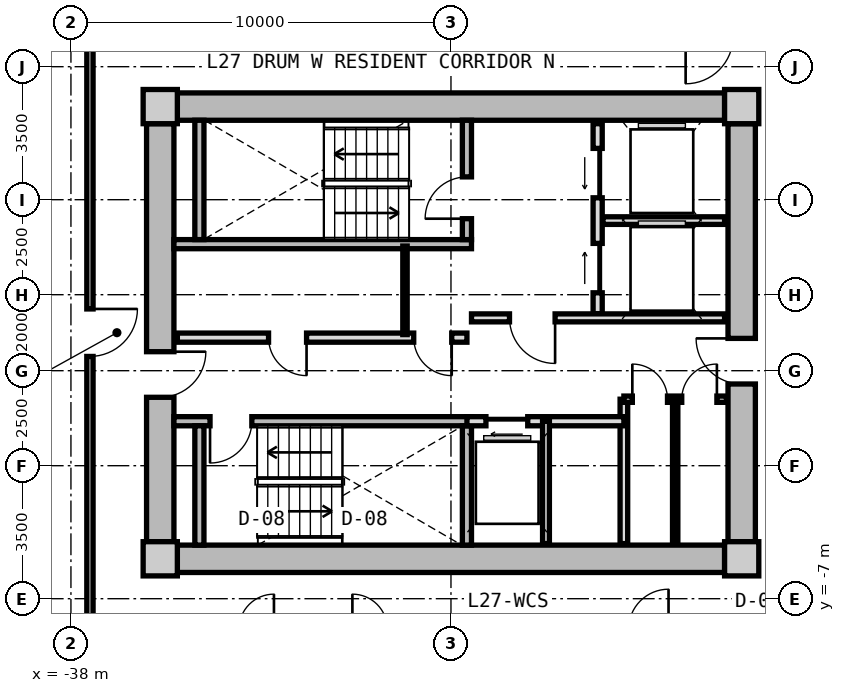
"""IFC4 building model, lengths in metres.
Left out: names, types, materials, properties, quantities, classifications, styles, units other than length and angle.
Written with IfcOpenShell. Run it as: python <this file> out.ifc"""

import sys

from ifc_helpers import new_model, si_unit, direction, frame, frame_2d, origin, origin_2d, place, context, subcontext, project, spatial, rectangle, extrude, source, transform, mapped, element, fill, save


model = new_model("IFC4")
c1 = context("Model", 3, precision=1e-05, world=origin(), true_north=direction((0.0, 1.0)))
c2 = subcontext(c1, "Body", "Model", "MODEL_VIEW")
j1 = project(units=[si_unit("LENGTHUNIT", "METRE"), si_unit("PLANEANGLEUNIT", "RADIAN")], contexts=[c1])
p1 = place(None, origin())
s1 = spatial("IfcSite", under=j1, at=p1, CompositionType="ELEMENT")
p2 = place(p1, origin())
s2 = spatial("IfcBuilding", under=s1, at=p2, CompositionType="ELEMENT")
p3 = place(p2, frame((0.0, 0.0, 90.15)))
s3 = spatial("IfcBuildingStorey", under=s2, at=p3, CompositionType="ELEMENT", Elevation=90.15)
m1 = source(origin(), c2, "Body", "SweptSolid", [
    extrude(rectangle(XDim=0.9, YDim=0.9, at=origin_2d()), origin(), (0.0, 0.0, 1.0), 3.05),
])
for number, where, z_axis, x_axis in (
    (1, (-35.65, -5.95, 0.0), (0.0, 0.0, 1.0), (1.0, 0.0, 0.0)),
    (2, (-20.35, -5.95, 0.0), (0.0, 0.0, 1.0), (1.0, 0.0, 0.0)),
    (3, (-20.35, 5.95, 0.0), (0.0, 0.0, 1.0), (1.0, 0.0, 0.0)),
    (4, (-35.65, 5.95, 0.0), (0.0, 0.0, 1.0), (1.0, 0.0, 0.0)),
):
    element("IfcColumn", number, at=place(p3, frame(where, z_axis=z_axis, x_axis=x_axis)), inside=s3, PredefinedType="COLUMN", context=c2, shape_type="MappedRepresentation", body=[
        mapped(m1, transform((0.0, 0.0, 0.0), x_axis=(1.0, 0.0, 0.0), y_axis=(0.0, 1.0, 0.0), z_axis=(0.0, 0.0, 1.0), scale=1.0)),
    ])
m2 = source(origin(), c2, "Body", "SweptSolid", [
    extrude(rectangle(XDim=14.4, YDim=0.72, at=frame_2d((7.2, 0.0))), origin(), (0.0, 0.0, 1.0), 2.79),
])
for number, where, z_axis, x_axis in (
    (5, (-35.2, 5.95, 0.0), (0.0, 0.0, 1.0), (1.0, 0.0, 0.0)),
    (6, (-20.8, -5.95, 0.0), (0.0, 0.0, 1.0), (-1.0, 0.0, 0.0)),
):
    element("IfcWall", number, at=place(p3, frame(where, z_axis=z_axis, x_axis=x_axis)), inside=s3, PredefinedType="SHEAR", context=c2, shape_type="MappedRepresentation", body=[
        mapped(m2, transform((0.0, 0.0, 0.0), x_axis=(1.0, 0.0, 0.0), y_axis=(0.0, 1.0, 0.0), z_axis=(0.0, 0.0, 1.0), scale=1.0)),
    ])
m3 = source(origin(), c2, "Body", "SweptSolid", [
    extrude(rectangle(XDim=11.0, YDim=0.72, at=frame_2d((5.5, 0.0))), origin(), (0.0, 0.0, 1.0), 2.79),
])
p4 = place(p3, frame((-35.65, -5.5, 0.0), z_axis=(0.0, 0.0, 1.0), x_axis=(0.0, 1.0, 0.0)))
e7 = element("IfcWall", 7, at=p4, inside=s3, PredefinedType="SHEAR", context=c2, shape_type="MappedRepresentation", body=[
    mapped(m3, transform((0.0, 0.0, 0.0), x_axis=(1.0, 0.0, 0.0), y_axis=(0.0, 1.0, 0.0), z_axis=(0.0, 0.0, 1.0), scale=1.0)),
])
p5 = place(p4, frame((3.8, 0.0, 0.0)))
e8 = element("IfcOpeningElement", 8, at=p5, cuts=e7, PredefinedType="OPENING", context=c2, shape_type="SweptSolid", body=[
    extrude(rectangle(XDim=1.2, YDim=2.15, at=frame_2d((0.6, 1.075))), frame((0.0, 0.37, 0.0), z_axis=(0.0, -1.0, 0.0), x_axis=(1.0, 0.0, 0.0)), (0.0, 0.0, 1.0), 0.74),
])
p6 = place(p3, frame((-20.35, 5.5, 0.0), z_axis=(0.0, 0.0, 1.0), x_axis=(0.0, -1.0, 0.0)))
e9 = element("IfcWall", 9, at=p6, inside=s3, PredefinedType="SHEAR", context=c2, shape_type="MappedRepresentation", body=[
    mapped(m3, transform((0.0, 0.0, 0.0), x_axis=(1.0, 0.0, 0.0), y_axis=(0.0, 1.0, 0.0), z_axis=(0.0, 0.0, 1.0), scale=1.0)),
])
p7 = place(p6, frame((5.65, 0.0, 0.0)))
e10 = element("IfcOpeningElement", 10, at=p7, cuts=e9, PredefinedType="OPENING", context=c2, shape_type="SweptSolid", body=[
    extrude(rectangle(XDim=1.2, YDim=2.15, at=frame_2d((0.6, 1.075))), frame((0.0, 0.37, 0.0), z_axis=(0.0, -1.0, 0.0), x_axis=(1.0, 0.0, 0.0)), (0.0, 0.0, 1.0), 0.74),
])
m4 = source(origin(), c2, "Body", "SweptSolid", [
    extrude(rectangle(XDim=7.83, YDim=0.24, at=frame_2d((3.915, 0.0))), origin(), (0.0, 0.0, 1.0), 2.79),
])
p8 = place(p3, frame((-35.29, 2.33, 0.0), z_axis=(0.0, 0.0, 1.0), x_axis=(1.0, 0.0, 0.0)))
e11 = element("IfcWall", 11, at=p8, inside=s3, PredefinedType="PARTITIONING", context=c2, shape_type="MappedRepresentation", body=[
    mapped(m4, transform((0.0, 0.0, 0.0), x_axis=(1.0, 0.0, 0.0), y_axis=(0.0, 1.0, 0.0), z_axis=(0.0, 0.0, 1.0), scale=1.0)),
])
m5 = source(origin(), c2, "Body", "SweptSolid", [
    extrude(rectangle(XDim=3.14, YDim=0.24, at=frame_2d((1.57, 0.0))), origin(), (0.0, 0.0, 1.0), 2.79),
])
p9 = place(p3, frame((-34.62, 2.45, 0.0), z_axis=(0.0, 0.0, 1.0), x_axis=(0.0, 1.0, 0.0)))
e12 = element("IfcWall", 12, at=p9, inside=s3, PredefinedType="PARTITIONING", context=c2, shape_type="MappedRepresentation", body=[
    mapped(m5, transform((0.0, 0.0, 0.0), x_axis=(1.0, 0.0, 0.0), y_axis=(0.0, 1.0, 0.0), z_axis=(0.0, 0.0, 1.0), scale=1.0)),
])
p10 = place(p3, frame((-27.58, 2.45, 0.0), z_axis=(0.0, 0.0, 1.0), x_axis=(0.0, 1.0, 0.0)))
e13 = element("IfcWall", 13, at=p10, inside=s3, PredefinedType="PARTITIONING", context=c2, shape_type="MappedRepresentation", body=[
    mapped(m5, transform((0.0, 0.0, 0.0), x_axis=(1.0, 0.0, 0.0), y_axis=(0.0, 1.0, 0.0), z_axis=(0.0, 0.0, 1.0), scale=1.0)),
])
p11 = place(p10, frame((0.55, 0.0, 0.0)))
e14 = element("IfcOpeningElement", 14, at=p11, cuts=e13, PredefinedType="OPENING", context=c2, shape_type="SweptSolid", body=[
    extrude(rectangle(XDim=1.1, YDim=2.15, at=frame_2d((0.55, 1.075))), frame((0.0, 0.13, 0.0), z_axis=(0.0, -1.0, 0.0), x_axis=(1.0, 0.0, 0.0)), (0.0, 0.0, 1.0), 0.26),
])
p12 = place(p3, frame((-35.29, -2.33, 0.0), z_axis=(0.0, 0.0, 1.0), x_axis=(1.0, 0.0, 0.0)))
e15 = element("IfcWall", 15, at=p12, inside=s3, PredefinedType="PARTITIONING", context=c2, shape_type="MappedRepresentation", body=[
    mapped(m4, transform((0.0, 0.0, 0.0), x_axis=(1.0, 0.0, 0.0), y_axis=(0.0, 1.0, 0.0), z_axis=(0.0, 0.0, 1.0), scale=1.0)),
])
p13 = place(p12, frame((0.95, 0.0, 0.0)))
e16 = element("IfcOpeningElement", 16, at=p13, cuts=e15, PredefinedType="OPENING", context=c2, shape_type="SweptSolid", body=[
    extrude(rectangle(XDim=1.1, YDim=2.15, at=frame_2d((0.55, 1.075))), frame((0.0, 0.13, 0.0), z_axis=(0.0, -1.0, 0.0), x_axis=(1.0, 0.0, 0.0)), (0.0, 0.0, 1.0), 0.26),
])
for number, where, z_axis, x_axis in (
    (17, (-34.62, -5.59, 0.0), (0.0, 0.0, 1.0), (0.0, 1.0, 0.0)),
    (18, (-27.58, -5.59, 0.0), (0.0, 0.0, 1.0), (0.0, 1.0, 0.0)),
):
    element("IfcWall", number, at=place(p3, frame(where, z_axis=z_axis, x_axis=x_axis)), inside=s3, PredefinedType="PARTITIONING", context=c2, shape_type="MappedRepresentation", body=[
        mapped(m5, transform((0.0, 0.0, 0.0), x_axis=(1.0, 0.0, 0.0), y_axis=(0.0, 1.0, 0.0), z_axis=(0.0, 0.0, 1.0), scale=1.0)),
    ])
m6 = source(origin(), c2, "Body", "SweptSolid", [
    extrude(rectangle(XDim=5.0, YDim=0.24, at=frame_2d((2.5, 0.0))), origin(), (0.0, 0.0, 1.0), 2.775),
])
p14 = place(p3, frame((-24.14, 0.5, 0.0), z_axis=(0.0, 0.0, 1.0), x_axis=(0.0, 1.0, 0.0)))
e19 = element("IfcWall", 19, at=p14, inside=s3, PredefinedType="PARTITIONING", context=c2, shape_type="MappedRepresentation", body=[
    mapped(m6, transform((0.0, 0.0, 0.0), x_axis=(1.0, 0.0, 0.0), y_axis=(0.0, 1.0, 0.0), z_axis=(0.0, 0.0, 1.0), scale=1.0)),
])
p15 = place(p14, frame((3.05, 0.0, 0.0)))
e20 = element("IfcOpeningElement", 20, at=p15, cuts=e19, PredefinedType="OPENING", context=c2, shape_type="SweptSolid", body=[
    extrude(rectangle(XDim=1.3, YDim=2.2, at=frame_2d((0.65, 1.1))), frame((0.0, 0.13, 0.0), z_axis=(0.0, -1.0, 0.0), x_axis=(1.0, 0.0, 0.0)), (0.0, 0.0, 1.0), 0.26),
])
p16 = place(p14, frame((0.55, 0.0, 0.0)))
e21 = element("IfcOpeningElement", 21, at=p16, cuts=e19, PredefinedType="OPENING", context=c2, shape_type="SweptSolid", body=[
    extrude(rectangle(XDim=1.3, YDim=2.2, at=frame_2d((0.65, 1.1))), frame((0.0, 0.13, 0.0), z_axis=(0.0, -1.0, 0.0), x_axis=(1.0, 0.0, 0.0)), (0.0, 0.0, 1.0), 0.26),
])
m7 = source(origin(), c2, "Body", "SweptSolid", [
    extrude(rectangle(XDim=3.2, YDim=0.2, at=frame_2d((1.6, 0.0))), origin(), (0.0, 0.0, 1.0), 2.775),
])
p17 = place(p3, frame((-24.0, 2.95, 0.0), z_axis=(0.0, 0.0, 1.0), x_axis=(1.0, 0.0, 0.0)))
e22 = element("IfcWall", 22, at=p17, inside=s3, PredefinedType="PARTITIONING", context=c2, shape_type="MappedRepresentation", body=[
    mapped(m7, transform((0.0, 0.0, 0.0), x_axis=(1.0, 0.0, 0.0), y_axis=(0.0, 1.0, 0.0), z_axis=(0.0, 0.0, 1.0), scale=1.0)),
])
m8 = source(origin(), c2, "Body", "SweptSolid", [
    extrude(rectangle(XDim=6.66, YDim=0.21, at=frame_2d((3.33, 0.0))), origin(), (0.0, 0.0, 1.0), 2.775),
])
p18 = place(p3, frame((-27.46, 0.39, 0.0), z_axis=(0.0, 0.0, 1.0), x_axis=(1.0, 0.0, 0.0)))
e23 = element("IfcWall", 23, at=p18, inside=s3, PredefinedType="PARTITIONING", context=c2, shape_type="MappedRepresentation", body=[
    mapped(m8, transform((0.0, 0.0, 0.0), x_axis=(1.0, 0.0, 0.0), y_axis=(0.0, 1.0, 0.0), z_axis=(0.0, 0.0, 1.0), scale=1.0)),
])
p19 = place(p18, frame((1.0, 0.0, 0.0)))
e24 = element("IfcOpeningElement", 24, at=p19, cuts=e23, PredefinedType="OPENING", context=c2, shape_type="SweptSolid", body=[
    extrude(rectangle(XDim=1.2, YDim=2.15, at=frame_2d((0.6, 1.075))), frame((0.0, 0.115, 0.0), z_axis=(0.0, -1.0, 0.0), x_axis=(1.0, 0.0, 0.0)), (0.0, 0.0, 1.0), 0.23),
])
m9 = source(origin(), c2, "Body", "SweptSolid", [
    extrude(rectangle(XDim=7.62, YDim=0.24, at=frame_2d((3.81, 0.0))), origin(), (0.0, 0.0, 1.0), 2.775),
])
p20 = place(p3, frame((-35.2, -0.13, 0.0), z_axis=(0.0, 0.0, 1.0), x_axis=(1.0, 0.0, 0.0)))
e25 = element("IfcWall", 25, at=p20, inside=s3, PredefinedType="PARTITIONING", context=c2, shape_type="MappedRepresentation", body=[
    mapped(m9, transform((0.0, 0.0, 0.0), x_axis=(1.0, 0.0, 0.0), y_axis=(0.0, 1.0, 0.0), z_axis=(0.0, 0.0, 1.0), scale=1.0)),
])
p21 = place(p20, frame((6.22, 0.0, 0.0)))
e26 = element("IfcOpeningElement", 26, at=p21, cuts=e25, PredefinedType="OPENING", context=c2, shape_type="SweptSolid", body=[
    extrude(rectangle(XDim=1.0, YDim=2.1, at=frame_2d((0.5, 1.05))), frame((0.0, 0.13, 0.0), z_axis=(0.0, -1.0, 0.0), x_axis=(1.0, 0.0, 0.0)), (0.0, 0.0, 1.0), 0.26),
])
p22 = place(p20, frame((2.4, 0.0, 0.0)))
e27 = element("IfcOpeningElement", 27, at=p22, cuts=e25, PredefinedType="OPENING", context=c2, shape_type="SweptSolid", body=[
    extrude(rectangle(XDim=1.0, YDim=2.1, at=frame_2d((0.5, 1.05))), frame((0.0, 0.13, 0.0), z_axis=(0.0, -1.0, 0.0), x_axis=(1.0, 0.0, 0.0)), (0.0, 0.0, 1.0), 0.26),
])
m10 = source(origin(), c2, "Body", "SweptSolid", [
    extrude(rectangle(XDim=2.33, YDim=0.115, at=frame_2d((1.165, 0.0))), origin(), (0.0, 0.0, 1.0), 2.775),
])
p23 = place(p3, frame((-29.21, -0.05, 0.0), z_axis=(0.0, 0.0, 1.0), x_axis=(0.0, 1.0, 0.0)))
e28 = element("IfcWall", 28, at=p23, inside=s3, PredefinedType="PARTITIONING", context=c2, shape_type="MappedRepresentation", body=[
    mapped(m10, transform((0.0, 0.0, 0.0), x_axis=(1.0, 0.0, 0.0), y_axis=(0.0, 1.0, 0.0), z_axis=(0.0, 0.0, 1.0), scale=1.0)),
])
m11 = source(origin(), c2, "Body", "SweptSolid", [
    extrude(rectangle(XDim=3.8, YDim=0.2, at=frame_2d((1.9, 0.0))), origin(), (0.0, 0.0, 1.0), 2.775),
])
p24 = place(p3, frame((-23.45, -5.55, 0.0), z_axis=(0.0, 0.0, 1.0), x_axis=(0.0, 1.0, 0.0)))
e29 = element("IfcWall", 29, at=p24, inside=s3, PredefinedType="PARTITIONING", context=c2, shape_type="MappedRepresentation", body=[
    mapped(m11, transform((0.0, 0.0, 0.0), x_axis=(1.0, 0.0, 0.0), y_axis=(0.0, 1.0, 0.0), z_axis=(0.0, 0.0, 1.0), scale=1.0)),
])
m12 = source(origin(), c2, "Body", "SweptSolid", [
    extrude(rectangle(XDim=4.13, YDim=0.24, at=frame_2d((2.065, 0.0))), origin(), (0.0, 0.0, 1.0), 2.775),
])
p25 = place(p3, frame((-27.58, -2.33, 0.0), z_axis=(0.0, 0.0, 1.0), x_axis=(1.0, 0.0, 0.0)))
e30 = element("IfcWall", 30, at=p25, inside=s3, PredefinedType="PARTITIONING", context=c2, shape_type="MappedRepresentation", body=[
    mapped(m12, transform((0.0, 0.0, 0.0), x_axis=(1.0, 0.0, 0.0), y_axis=(0.0, 1.0, 0.0), z_axis=(0.0, 0.0, 1.0), scale=1.0)),
])
p26 = place(p25, frame((0.5, 0.0, 0.0)))
e31 = element("IfcOpeningElement", 31, at=p26, cuts=e30, PredefinedType="OPENING", context=c2, shape_type="SweptSolid", body=[
    extrude(rectangle(XDim=1.1, YDim=2.2, at=frame_2d((0.55, 1.1))), frame((0.0, 0.13, 0.0), z_axis=(0.0, -1.0, 0.0), x_axis=(1.0, 0.0, 0.0)), (0.0, 0.0, 1.0), 0.26),
])
m13 = source(origin(), c2, "Body", "SweptSolid", [
    extrude(rectangle(XDim=3.22, YDim=0.18, at=frame_2d((1.61, 0.0))), origin(), (0.0, 0.0, 1.0), 2.775),
])
p27 = place(p3, frame((-25.5, -5.55, 0.0), z_axis=(0.0, 0.0, 1.0), x_axis=(0.0, 1.0, 0.0)))
e32 = element("IfcWall", 32, at=p27, inside=s3, PredefinedType="PARTITIONING", context=c2, shape_type="MappedRepresentation", body=[
    mapped(m13, transform((0.0, 0.0, 0.0), x_axis=(1.0, 0.0, 0.0), y_axis=(0.0, 1.0, 0.0), z_axis=(0.0, 0.0, 1.0), scale=1.0)),
])
m14 = source(origin(), c2, "Body", "SweptSolid", [
    extrude(rectangle(XDim=2.7, YDim=0.165, at=frame_2d((1.35, 0.0))), origin(), (0.0, 0.0, 1.0), 2.775),
])
p28 = place(p3, frame((-23.45, -1.75, 0.0), z_axis=(0.0, 0.0, 1.0), x_axis=(1.0, 0.0, 0.0)))
e33 = element("IfcWall", 33, at=p28, inside=s3, PredefinedType="PARTITIONING", context=c2, shape_type="MappedRepresentation", body=[
    mapped(m14, transform((0.0, 0.0, 0.0), x_axis=(1.0, 0.0, 0.0), y_axis=(0.0, 1.0, 0.0), z_axis=(0.0, 0.0, 1.0), scale=1.0)),
])
p29 = place(p28, frame((0.222, 0.0, 0.0)))
e34 = element("IfcOpeningElement", 34, at=p29, cuts=e33, PredefinedType="OPENING", context=c2, shape_type="SweptSolid", body=[
    extrude(rectangle(XDim=0.925, YDim=2.1, at=frame_2d((0.462, 1.05))), frame((0.0, 0.093, 0.0), z_axis=(0.0, -1.0, 0.0), x_axis=(1.0, 0.0, 0.0)), (0.0, 0.0, 1.0), 0.185),
])
p30 = place(p28, frame((1.522, 0.0, 0.0)))
e35 = element("IfcOpeningElement", 35, at=p30, cuts=e33, PredefinedType="OPENING", context=c2, shape_type="SweptSolid", body=[
    extrude(rectangle(XDim=0.925, YDim=2.1, at=frame_2d((0.462, 1.05))), frame((0.0, 0.093, 0.0), z_axis=(0.0, -1.0, 0.0), x_axis=(1.0, 0.0, 0.0)), (0.0, 0.0, 1.0), 0.185),
])
m15 = source(origin(), c2, "Body", "SweptSolid", [
    extrude(rectangle(XDim=3.8, YDim=0.14, at=frame_2d((1.9, 0.0))), origin(), (0.0, 0.0, 1.0), 2.775),
])
p31 = place(p3, frame((-22.1, -5.55, 0.0), z_axis=(0.0, 0.0, 1.0), x_axis=(0.0, 1.0, 0.0)))
e36 = element("IfcWall", 36, at=p31, inside=s3, PredefinedType="PARTITIONING", context=c2, shape_type="MappedRepresentation", body=[
    mapped(m15, transform((0.0, 0.0, 0.0), x_axis=(1.0, 0.0, 0.0), y_axis=(0.0, 1.0, 0.0), z_axis=(0.0, 0.0, 1.0), scale=1.0)),
])
m16 = source(origin(), c2, "Body", "SweptSolid", [
    extrude(rectangle(XDim=15.6, YDim=0.165, at=frame_2d((7.8, 0.0))), origin(), (0.0, 0.0, 1.0), 2.775),
])
p32 = place(p3, frame((-37.5, -7.8, 0.0), z_axis=(0.0, 0.0, 1.0), x_axis=(0.0, 1.0, 0.0)))
e37 = element("IfcWall", 37, at=p32, inside=s3, PredefinedType="PARTITIONING", context=c2, shape_type="MappedRepresentation", body=[
    mapped(m16, transform((0.0, 0.0, 0.0), x_axis=(1.0, 0.0, 0.0), y_axis=(0.0, 1.0, 0.0), z_axis=(0.0, 0.0, 1.0), scale=1.0)),
])
p33 = place(p32, frame((7.175, 0.0, 0.0)))
e38 = element("IfcOpeningElement", 38, at=p33, cuts=e37, PredefinedType="OPENING", context=c2, shape_type="SweptSolid", body=[
    extrude(rectangle(XDim=1.25, YDim=2.2, at=frame_2d((0.625, 1.1))), frame((0.0, 0.093, 0.0), z_axis=(0.0, -1.0, 0.0), x_axis=(1.0, 0.0, 0.0)), (0.0, 0.0, 1.0), 0.185),
])
m17 = source(origin(), c2, "Body", "SweptSolid", [
    extrude(rectangle(XDim=1.1, YDim=2.15, at=frame_2d((0.55, 1.075))), frame((0.0, 0.025, 0.0), z_axis=(0.0, -1.0, 0.0), x_axis=(1.0, 0.0, 0.0)), (0.0, 0.0, 1.0), 0.05),
])
p34 = place(p11, origin())
e39 = element("IfcDoor", 39, at=p34, inside=s3, OperationType="SINGLE_SWING_LEFT", PredefinedType="DOOR", context=c2, shape_type="MappedRepresentation", body=[
    mapped(m17, transform((0.0, 0.0, 0.0), x_axis=(1.0, 0.0, 0.0), y_axis=(0.0, 1.0, 0.0), z_axis=(0.0, 0.0, 1.0), scale=1.0)),
])
fill(e14, e39)
p35 = place(p13, frame((1.1, 0.0, 0.0), z_axis=(0.0, 0.0, 1.0), x_axis=(-1.0, 0.0, 0.0)))
e40 = element("IfcDoor", 40, at=p35, inside=s3, OperationType="SINGLE_SWING_RIGHT", PredefinedType="DOOR", context=c2, shape_type="MappedRepresentation", body=[
    mapped(m17, transform((0.0, 0.0, 0.0), x_axis=(1.0, 0.0, 0.0), y_axis=(0.0, 1.0, 0.0), z_axis=(0.0, 0.0, 1.0), scale=1.0)),
])
fill(e16, e40)
m18 = source(origin(), c2, "Body", "SweptSolid", [
    extrude(rectangle(XDim=1.3, YDim=2.2, at=frame_2d((0.65, 1.1))), frame((0.0, 0.025, 0.0), z_axis=(0.0, -1.0, 0.0), x_axis=(1.0, 0.0, 0.0)), (0.0, 0.0, 1.0), 0.05),
])
p36 = place(p15, origin())
e41 = element("IfcDoor", 41, at=p36, inside=s3, OperationType="SLIDING_TO_LEFT", PredefinedType="DOOR", context=c2, shape_type="MappedRepresentation", body=[
    mapped(m18, transform((0.0, 0.0, 0.0), x_axis=(1.0, 0.0, 0.0), y_axis=(0.0, 1.0, 0.0), z_axis=(0.0, 0.0, 1.0), scale=1.0)),
])
fill(e20, e41)
p37 = place(p16, origin())
e42 = element("IfcDoor", 42, at=p37, inside=s3, OperationType="SLIDING_TO_RIGHT", PredefinedType="DOOR", context=c2, shape_type="MappedRepresentation", body=[
    mapped(m18, transform((0.0, 0.0, 0.0), x_axis=(1.0, 0.0, 0.0), y_axis=(0.0, 1.0, 0.0), z_axis=(0.0, 0.0, 1.0), scale=1.0)),
])
fill(e21, e42)
m19 = source(origin(), c2, "Body", "SweptSolid", [
    extrude(rectangle(XDim=1.2, YDim=2.15, at=frame_2d((0.6, 1.075))), frame((0.0, 0.025, 0.0), z_axis=(0.0, -1.0, 0.0), x_axis=(1.0, 0.0, 0.0)), (0.0, 0.0, 1.0), 0.05),
])
p38 = place(p19, frame((1.2, 0.0, 0.0), z_axis=(0.0, 0.0, 1.0), x_axis=(-1.0, 0.0, 0.0)))
e43 = element("IfcDoor", 43, at=p38, inside=s3, OperationType="SINGLE_SWING_LEFT", PredefinedType="DOOR", context=c2, shape_type="MappedRepresentation", body=[
    mapped(m19, transform((0.0, 0.0, 0.0), x_axis=(1.0, 0.0, 0.0), y_axis=(0.0, 1.0, 0.0), z_axis=(0.0, 0.0, 1.0), scale=1.0)),
])
fill(e24, e43)
p39 = place(p5, frame((1.2, 0.0, 0.0), z_axis=(0.0, 0.0, 1.0), x_axis=(-1.0, 0.0, 0.0)))
e44 = element("IfcDoor", 44, at=p39, inside=s3, OperationType="SINGLE_SWING_LEFT", PredefinedType="DOOR", context=c2, shape_type="MappedRepresentation", body=[
    mapped(m19, transform((0.0, 0.0, 0.0), x_axis=(1.0, 0.0, 0.0), y_axis=(0.0, 1.0, 0.0), z_axis=(0.0, 0.0, 1.0), scale=1.0)),
])
fill(e8, e44)
p40 = place(p7, frame((1.2, 0.0, 0.0), z_axis=(0.0, 0.0, 1.0), x_axis=(-1.0, 0.0, 0.0)))
e45 = element("IfcDoor", 45, at=p40, inside=s3, OperationType="SINGLE_SWING_RIGHT", PredefinedType="DOOR", context=c2, shape_type="MappedRepresentation", body=[
    mapped(m19, transform((0.0, 0.0, 0.0), x_axis=(1.0, 0.0, 0.0), y_axis=(0.0, 1.0, 0.0), z_axis=(0.0, 0.0, 1.0), scale=1.0)),
])
fill(e10, e45)
m20 = source(origin(), c2, "Body", "SweptSolid", [
    extrude(rectangle(XDim=1.0, YDim=2.1, at=frame_2d((0.5, 1.05))), frame((0.0, 0.025, 0.0), z_axis=(0.0, -1.0, 0.0), x_axis=(1.0, 0.0, 0.0)), (0.0, 0.0, 1.0), 0.05),
])
p41 = place(p21, frame((1.0, 0.0, 0.0), z_axis=(0.0, 0.0, 1.0), x_axis=(-1.0, 0.0, 0.0)))
e46 = element("IfcDoor", 46, at=p41, inside=s3, OperationType="SINGLE_SWING_LEFT", PredefinedType="DOOR", context=c2, shape_type="MappedRepresentation", body=[
    mapped(m20, transform((0.0, 0.0, 0.0), x_axis=(1.0, 0.0, 0.0), y_axis=(0.0, 1.0, 0.0), z_axis=(0.0, 0.0, 1.0), scale=1.0)),
])
fill(e26, e46)
p42 = place(p22, frame((1.0, 0.0, 0.0), z_axis=(0.0, 0.0, 1.0), x_axis=(-1.0, 0.0, 0.0)))
e47 = element("IfcDoor", 47, at=p42, inside=s3, OperationType="SINGLE_SWING_LEFT", PredefinedType="DOOR", context=c2, shape_type="MappedRepresentation", body=[
    mapped(m20, transform((0.0, 0.0, 0.0), x_axis=(1.0, 0.0, 0.0), y_axis=(0.0, 1.0, 0.0), z_axis=(0.0, 0.0, 1.0), scale=1.0)),
])
fill(e27, e47)
m21 = source(origin(), c2, "Body", "SweptSolid", [
    extrude(rectangle(XDim=1.1, YDim=2.2, at=frame_2d((0.55, 1.1))), frame((0.0, 0.025, 0.0), z_axis=(0.0, -1.0, 0.0), x_axis=(1.0, 0.0, 0.0)), (0.0, 0.0, 1.0), 0.05),
])
p43 = place(p26, frame((1.1, 0.0, 0.0), z_axis=(0.0, 0.0, 1.0), x_axis=(-1.0, 0.0, 0.0)))
e48 = element("IfcDoor", 48, at=p43, inside=s3, OperationType="SLIDING_TO_LEFT", PredefinedType="DOOR", context=c2, shape_type="MappedRepresentation", body=[
    mapped(m21, transform((0.0, 0.0, 0.0), x_axis=(1.0, 0.0, 0.0), y_axis=(0.0, 1.0, 0.0), z_axis=(0.0, 0.0, 1.0), scale=1.0)),
])
fill(e31, e48)
m22 = source(origin(), c2, "Body", "SweptSolid", [
    extrude(rectangle(XDim=0.925, YDim=2.1, at=frame_2d((0.462, 1.05))), frame((0.0, 0.025, 0.0), z_axis=(0.0, -1.0, 0.0), x_axis=(1.0, 0.0, 0.0)), (0.0, 0.0, 1.0), 0.05),
])
p44 = place(p29, origin())
e49 = element("IfcDoor", 49, at=p44, inside=s3, OperationType="SINGLE_SWING_LEFT", PredefinedType="DOOR", context=c2, shape_type="MappedRepresentation", body=[
    mapped(m22, transform((0.0, 0.0, 0.0), x_axis=(1.0, 0.0, 0.0), y_axis=(0.0, 1.0, 0.0), z_axis=(0.0, 0.0, 1.0), scale=1.0)),
])
fill(e34, e49)
p45 = place(p30, origin())
e50 = element("IfcDoor", 50, at=p45, inside=s3, OperationType="SINGLE_SWING_RIGHT", PredefinedType="DOOR", context=c2, shape_type="MappedRepresentation", body=[
    mapped(m22, transform((0.0, 0.0, 0.0), x_axis=(1.0, 0.0, 0.0), y_axis=(0.0, 1.0, 0.0), z_axis=(0.0, 0.0, 1.0), scale=1.0)),
])
fill(e35, e50)
m23 = source(origin(), c2, "Body", "SweptSolid", [
    extrude(rectangle(XDim=1.25, YDim=2.2, at=frame_2d((0.625, 1.1))), frame((0.0, 0.025, 0.0), z_axis=(0.0, -1.0, 0.0), x_axis=(1.0, 0.0, 0.0)), (0.0, 0.0, 1.0), 0.05),
])
p46 = place(p33, frame((1.25, 0.0, 0.0), z_axis=(0.0, 0.0, 1.0), x_axis=(-1.0, 0.0, 0.0)))
e51 = element("IfcDoor", 51, at=p46, inside=s3, OperationType="SINGLE_SWING_LEFT", PredefinedType="DOOR", context=c2, shape_type="MappedRepresentation", body=[
    mapped(m23, transform((0.0, 0.0, 0.0), x_axis=(1.0, 0.0, 0.0), y_axis=(0.0, 1.0, 0.0), z_axis=(0.0, 0.0, 1.0), scale=1.0)),
])
fill(e38, e51)
save(model, sys.argv[1])
